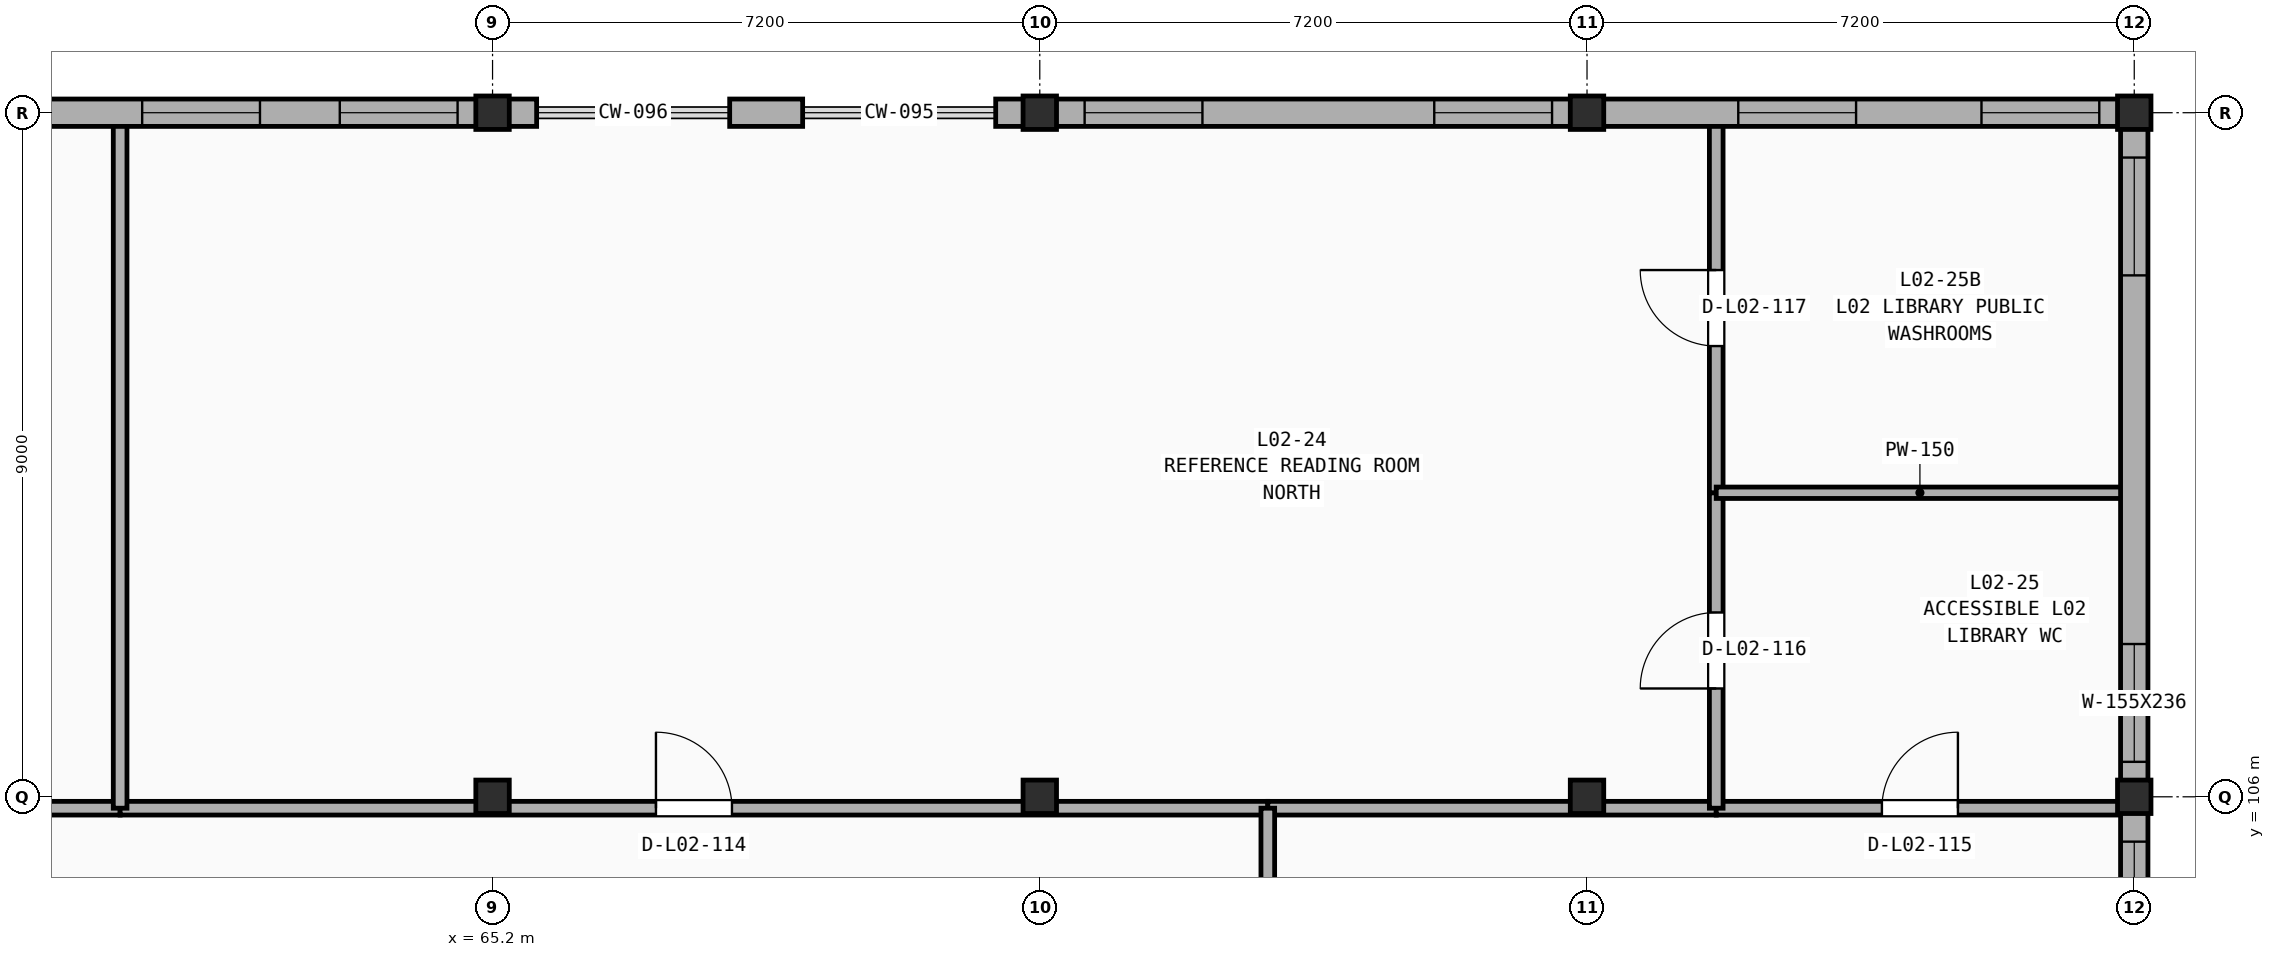
"""IFC4 building model, lengths in metres.
Left out: names, types, materials, properties, quantities, classifications, styles, units other than length and angle.
Written with IfcOpenShell. Run it as: python <this file> out.ifc"""

import sys

from ifc_helpers import new_model, si_unit, direction, frame, frame_2d, origin, origin_2d, place, context, subcontext, project, spatial, rectangle, extrude, element, fill, save


model = new_model("IFC4")
c1 = context("Model", 3, precision=1e-05, world=origin(), true_north=direction((0.0, 1.0)))
c2 = subcontext(c1, "Body", "Model", "MODEL_VIEW")
j1 = project(units=[si_unit("LENGTHUNIT", "METRE"), si_unit("PLANEANGLEUNIT", "RADIAN")], contexts=[c1])
p1 = place(None, origin())
s1 = spatial("IfcSite", under=j1, at=p1, CompositionType="ELEMENT")
p2 = place(p1, origin())
s2 = spatial("IfcBuilding", under=s1, at=p2, CompositionType="ELEMENT")
p3 = place(p2, frame((0.0, 0.0, 9.6)))
s3 = spatial("IfcBuildingStorey", under=s2, at=p3, CompositionType="ELEMENT", Elevation=9.6)
for number, where, z_axis, x_axis in (
    (1, (65.2, 106.0, 0.0), (0.0, 0.0, 1.0), (1.0, 0.0, 0.0)),
    (2, (65.2, 115.0, 0.0), (0.0, 0.0, 1.0), (1.0, 0.0, 0.0)),
    (3, (72.4, 106.0, 0.0), (0.0, 0.0, 1.0), (1.0, 0.0, 0.0)),
    (4, (72.4, 115.0, 0.0), (0.0, 0.0, 1.0), (1.0, 0.0, 0.0)),
    (5, (79.6, 106.0, 0.0), (0.0, 0.0, 1.0), (1.0, 0.0, 0.0)),
    (6, (79.6, 115.0, 0.0), (0.0, 0.0, 1.0), (1.0, 0.0, 0.0)),
    (7, (86.8, 106.0, 0.0), (0.0, 0.0, 1.0), (1.0, 0.0, 0.0)),
    (8, (86.8, 115.0, 0.0), (0.0, 0.0, 1.0), (1.0, 0.0, 0.0)),
):
    element("IfcColumn", number, at=place(p3, frame(where, z_axis=z_axis, x_axis=x_axis)), inside=s3, PredefinedType="COLUMN", context=c2, shape_type="SweptSolid", body=[
        extrude(rectangle(XDim=0.44, YDim=0.44, at=origin_2d()), origin(), (0.0, 0.0, 1.0), 4.2),
    ])
p4 = place(p3, frame((54.55, 105.85, 0.0), z_axis=(0.0, 0.0, 1.0), x_axis=(1.0, 0.0, 0.0)))
e9 = element("IfcWall", 9, at=p4, inside=s3, PredefinedType="PARTITIONING", context=c2, shape_type="SweptSolid", body=[
    extrude(rectangle(XDim=5.75, YDim=0.18, at=frame_2d((2.875, 0.0))), origin(), (0.0, 0.0, 1.0), 3.25),
])
p5 = place(p3, frame((60.3, 105.85, 0.0), z_axis=(0.0, 0.0, 1.0), x_axis=(1.0, 0.0, 0.0)))
e10 = element("IfcWall", 10, at=p5, inside=s3, PredefinedType="PARTITIONING", context=c2, shape_type="SweptSolid", body=[
    extrude(rectangle(XDim=15.1, YDim=0.18, at=frame_2d((7.55, 0.0))), origin(), (0.0, 0.0, 1.0), 3.25),
])
p6 = place(p5, frame((7.05, 0.0, -0.01)))
e11 = element("IfcOpeningElement", 11, at=p6, cuts=e10, PredefinedType="OPENING", context=c2, shape_type="SweptSolid", body=[
    extrude(rectangle(XDim=1.0, YDim=2.16, at=frame_2d((0.5, 1.08))), frame((0.0, 0.1, 0.0), z_axis=(0.0, -1.0, 0.0), x_axis=(1.0, 0.0, 0.0)), (0.0, 0.0, 1.0), 0.2),
])
p7 = place(p3, frame((75.4, 105.85, 0.0), z_axis=(0.0, 0.0, 1.0), x_axis=(1.0, 0.0, 0.0)))
e12 = element("IfcWall", 12, at=p7, inside=s3, PredefinedType="PARTITIONING", context=c2, shape_type="SweptSolid", body=[
    extrude(rectangle(XDim=5.9, YDim=0.18, at=frame_2d((2.95, 0.0))), origin(), (0.0, 0.0, 1.0), 3.25),
])
p8 = place(p3, frame((81.3, 105.85, 0.0), z_axis=(0.0, 0.0, 1.0), x_axis=(1.0, 0.0, 0.0)))
e13 = element("IfcWall", 13, at=p8, inside=s3, PredefinedType="PARTITIONING", context=c2, shape_type="SweptSolid", body=[
    extrude(rectangle(XDim=5.36, YDim=0.18, at=frame_2d((2.68, 0.0))), origin(), (0.0, 0.0, 1.0), 3.25),
])
p9 = place(p8, frame((2.18, 0.0, -0.01)))
e14 = element("IfcOpeningElement", 14, at=p9, cuts=e13, PredefinedType="OPENING", context=c2, shape_type="SweptSolid", body=[
    extrude(rectangle(XDim=1.0, YDim=2.16, at=frame_2d((0.5, 1.08))), frame((0.0, 0.1, 0.0), z_axis=(0.0, -1.0, 0.0), x_axis=(1.0, 0.0, 0.0)), (0.0, 0.0, 1.0), 0.2),
])
p10 = place(p3, frame((60.3, 105.85, 0.0), z_axis=(0.0, 0.0, 1.0), x_axis=(0.0, 1.0, 0.0)))
e15 = element("IfcWall", 15, at=p10, inside=s3, PredefinedType="PARTITIONING", context=c2, shape_type="SweptSolid", body=[
    extrude(rectangle(XDim=9.01, YDim=0.18, at=frame_2d((4.505, 0.0))), origin(), (0.0, 0.0, 1.0), 3.25),
])
p11 = place(p3, frame((81.3, 105.85, 0.0), z_axis=(0.0, 0.0, 1.0), x_axis=(0.0, 1.0, 0.0)))
e16 = element("IfcWall", 16, at=p11, inside=s3, PredefinedType="PARTITIONING", context=c2, shape_type="SweptSolid", body=[
    extrude(rectangle(XDim=4.15, YDim=0.18, at=frame_2d((2.075, 0.0))), origin(), (0.0, 0.0, 1.0), 3.25),
])
p12 = place(p11, frame((1.575, 0.0, -0.01)))
e17 = element("IfcOpeningElement", 17, at=p12, cuts=e16, PredefinedType="OPENING", context=c2, shape_type="SweptSolid", body=[
    extrude(rectangle(XDim=1.0, YDim=2.16, at=frame_2d((0.5, 1.08))), frame((0.0, 0.1, 0.0), z_axis=(0.0, -1.0, 0.0), x_axis=(1.0, 0.0, 0.0)), (0.0, 0.0, 1.0), 0.2),
])
p13 = place(p3, frame((81.3, 110.0, 0.0), z_axis=(0.0, 0.0, 1.0), x_axis=(0.0, 1.0, 0.0)))
e18 = element("IfcWall", 18, at=p13, inside=s3, PredefinedType="PARTITIONING", context=c2, shape_type="SweptSolid", body=[
    extrude(rectangle(XDim=4.86, YDim=0.18, at=frame_2d((2.43, 0.0))), origin(), (0.0, 0.0, 1.0), 3.61),
])
p14 = place(p13, frame((1.93, 0.0, -0.01)))
e19 = element("IfcOpeningElement", 19, at=p14, cuts=e18, PredefinedType="OPENING", context=c2, shape_type="SweptSolid", body=[
    extrude(rectangle(XDim=1.0, YDim=2.16, at=frame_2d((0.5, 1.08))), frame((0.0, 0.1, 0.0), z_axis=(0.0, -1.0, 0.0), x_axis=(1.0, 0.0, 0.0)), (0.0, 0.0, 1.0), 0.2),
])
p15 = place(p3, frame((81.3, 110.0, 0.0), z_axis=(0.0, 0.0, 1.0), x_axis=(1.0, 0.0, 0.0)))
e20 = element("IfcWall", 20, at=p15, inside=s3, PredefinedType="PARTITIONING", context=c2, shape_type="SweptSolid", body=[
    extrude(rectangle(XDim=5.36, YDim=0.15, at=frame_2d((2.68, 0.0))), origin(), (0.0, 0.0, 1.0), 3.57),
])
p16 = place(p3, frame((75.4, 97.5, 0.0), z_axis=(0.0, 0.0, 1.0), x_axis=(0.0, 1.0, 0.0)))
e21 = element("IfcWall", 21, at=p16, inside=s3, PredefinedType="PARTITIONING", context=c2, shape_type="SweptSolid", body=[
    extrude(rectangle(XDim=8.35, YDim=0.18, at=frame_2d((4.175, 0.0))), origin(), (0.0, 0.0, 1.0), 3.25),
])
p17 = place(p3, frame((65.2, 115.0, 0.0), z_axis=(0.0, 0.0, 1.0), x_axis=(-1.0, 0.0, 0.0)))
e22 = element("IfcWall", 22, at=p17, inside=s3, PredefinedType="SOLIDWALL", context=c2, shape_type="SweptSolid", body=[
    extrude(rectangle(XDim=7.2, YDim=0.36, at=frame_2d((3.6, 0.0))), origin(), (0.0, 0.0, 1.0), 3.45),
])
p18 = place(p17, frame((0.46, 0.0, 0.75)))
e23 = element("IfcOpeningElement", 23, at=p18, cuts=e22, PredefinedType="OPENING", context=c2, shape_type="SweptSolid", body=[
    extrude(rectangle(XDim=1.55, YDim=2.4, at=frame_2d((0.775, 1.2))), frame((0.0, 0.19, 0.0), z_axis=(0.0, -1.0, 0.0), x_axis=(1.0, 0.0, 0.0)), (0.0, 0.0, 1.0), 0.38),
])
p19 = place(p17, frame((3.06, 0.0, 0.75)))
e24 = element("IfcOpeningElement", 24, at=p19, cuts=e22, PredefinedType="OPENING", context=c2, shape_type="SweptSolid", body=[
    extrude(rectangle(XDim=1.55, YDim=2.4, at=frame_2d((0.775, 1.2))), frame((0.0, 0.19, 0.0), z_axis=(0.0, -1.0, 0.0), x_axis=(1.0, 0.0, 0.0)), (0.0, 0.0, 1.0), 0.38),
])
p20 = place(p3, frame((69.28, 115.0, 0.0), z_axis=(0.0, 0.0, 1.0), x_axis=(-1.0, 0.0, 0.0)))
e25 = element("IfcWall", 25, at=p20, inside=s3, PredefinedType="SOLIDWALL", context=c2, shape_type="SweptSolid", body=[
    extrude(rectangle(XDim=0.96, YDim=0.36, at=frame_2d((0.48, 0.0))), origin(), (0.0, 0.0, 1.0), 3.45),
])
for number, where, z_axis, x_axis in (
    (26, (72.27, 115.0, 0.0), (0.0, 0.0, 1.0), (-1.0, 0.0, 0.0)),
    (27, (65.78, 115.0, 0.0), (0.0, 0.0, 1.0), (-1.0, 0.0, 0.0)),
):
    element("IfcWall", number, at=place(p3, frame(where, z_axis=z_axis, x_axis=x_axis)), inside=s3, PredefinedType="SOLIDWALL", context=c2, shape_type="SweptSolid", body=[
        extrude(rectangle(XDim=0.45, YDim=0.36, at=frame_2d((0.225, 0.0))), origin(), (0.0, 0.0, 1.0), 3.45),
    ])
p21 = place(p3, frame((79.6, 115.0, 0.0), z_axis=(0.0, 0.0, 1.0), x_axis=(-1.0, 0.0, 0.0)))
e28 = element("IfcWall", 28, at=p21, inside=s3, PredefinedType="SOLIDWALL", context=c2, shape_type="SweptSolid", body=[
    extrude(rectangle(XDim=7.2, YDim=0.36, at=frame_2d((3.6, 0.0))), origin(), (0.0, 0.0, 1.0), 3.45),
])
p22 = place(p21, frame((0.46, 0.0, 0.75)))
e29 = element("IfcOpeningElement", 29, at=p22, cuts=e28, PredefinedType="OPENING", context=c2, shape_type="SweptSolid", body=[
    extrude(rectangle(XDim=1.55, YDim=2.4, at=frame_2d((0.775, 1.2))), frame((0.0, 0.19, 0.0), z_axis=(0.0, -1.0, 0.0), x_axis=(1.0, 0.0, 0.0)), (0.0, 0.0, 1.0), 0.38),
])
p23 = place(p21, frame((5.06, 0.0, 0.75)))
e30 = element("IfcOpeningElement", 30, at=p23, cuts=e28, PredefinedType="OPENING", context=c2, shape_type="SweptSolid", body=[
    extrude(rectangle(XDim=1.55, YDim=2.4, at=frame_2d((0.775, 1.2))), frame((0.0, 0.19, 0.0), z_axis=(0.0, -1.0, 0.0), x_axis=(1.0, 0.0, 0.0)), (0.0, 0.0, 1.0), 0.38),
])
p24 = place(p3, frame((86.8, 115.0, 0.0), z_axis=(0.0, 0.0, 1.0), x_axis=(-1.0, 0.0, 0.0)))
e31 = element("IfcWall", 31, at=p24, inside=s3, PredefinedType="SOLIDWALL", context=c2, shape_type="SweptSolid", body=[
    extrude(rectangle(XDim=7.2, YDim=0.36, at=frame_2d((3.6, 0.0))), origin(), (0.0, 0.0, 1.0), 3.45),
])
p25 = place(p24, frame((0.46, 0.0, 0.75)))
e32 = element("IfcOpeningElement", 32, at=p25, cuts=e31, PredefinedType="OPENING", context=c2, shape_type="SweptSolid", body=[
    extrude(rectangle(XDim=1.55, YDim=2.4, at=frame_2d((0.775, 1.2))), frame((0.0, 0.19, 0.0), z_axis=(0.0, -1.0, 0.0), x_axis=(1.0, 0.0, 0.0)), (0.0, 0.0, 1.0), 0.38),
])
p26 = place(p24, frame((3.66, 0.0, 0.75)))
e33 = element("IfcOpeningElement", 33, at=p26, cuts=e31, PredefinedType="OPENING", context=c2, shape_type="SweptSolid", body=[
    extrude(rectangle(XDim=1.55, YDim=2.4, at=frame_2d((0.775, 1.2))), frame((0.0, 0.19, 0.0), z_axis=(0.0, -1.0, 0.0), x_axis=(1.0, 0.0, 0.0)), (0.0, 0.0, 1.0), 0.38),
])
p27 = place(p3, frame((86.8, 97.6, 0.0), z_axis=(0.0, 0.0, 1.0), x_axis=(0.0, 1.0, 0.0)))
e34 = element("IfcWall", 34, at=p27, inside=s3, PredefinedType="SOLIDWALL", context=c2, shape_type="SweptSolid", body=[
    extrude(rectangle(XDim=8.4, YDim=0.36, at=frame_2d((4.2, 0.0))), origin(), (0.0, 0.0, 1.0), 3.25),
])
p28 = place(p27, frame((0.46, 0.0, 0.75)))
e35 = element("IfcOpeningElement", 35, at=p28, cuts=e34, PredefinedType="OPENING", context=c2, shape_type="SweptSolid", body=[
    extrude(rectangle(XDim=1.55, YDim=2.36, at=frame_2d((0.775, 1.18))), frame((0.0, 0.19, 0.0), z_axis=(0.0, -1.0, 0.0), x_axis=(1.0, 0.0, 0.0)), (0.0, 0.0, 1.0), 0.38),
])
p29 = place(p27, frame((6.26, 0.0, 0.75)))
e36 = element("IfcOpeningElement", 36, at=p29, cuts=e34, PredefinedType="OPENING", context=c2, shape_type="SweptSolid", body=[
    extrude(rectangle(XDim=1.55, YDim=2.36, at=frame_2d((0.775, 1.18))), frame((0.0, 0.19, 0.0), z_axis=(0.0, -1.0, 0.0), x_axis=(1.0, 0.0, 0.0)), (0.0, 0.0, 1.0), 0.38),
])
p30 = place(p3, frame((86.8, 106.0, 0.0), z_axis=(0.0, 0.0, 1.0), x_axis=(0.0, 1.0, 0.0)))
e37 = element("IfcWall", 37, at=p30, inside=s3, PredefinedType="SOLIDWALL", context=c2, shape_type="SweptSolid", body=[
    extrude(rectangle(XDim=9.0, YDim=0.36, at=frame_2d((4.5, 0.0))), origin(), (0.0, 0.0, 1.0), 3.25),
])
p31 = place(p30, frame((0.46, 0.0, 0.75)))
e38 = element("IfcOpeningElement", 38, at=p31, cuts=e37, PredefinedType="OPENING", context=c2, shape_type="SweptSolid", body=[
    extrude(rectangle(XDim=1.55, YDim=2.36, at=frame_2d((0.775, 1.18))), frame((0.0, 0.19, 0.0), z_axis=(0.0, -1.0, 0.0), x_axis=(1.0, 0.0, 0.0)), (0.0, 0.0, 1.0), 0.38),
])
p32 = place(p30, frame((6.86, 0.0, 0.75)))
e39 = element("IfcOpeningElement", 39, at=p32, cuts=e37, PredefinedType="OPENING", context=c2, shape_type="SweptSolid", body=[
    extrude(rectangle(XDim=1.55, YDim=2.36, at=frame_2d((0.775, 1.18))), frame((0.0, 0.19, 0.0), z_axis=(0.0, -1.0, 0.0), x_axis=(1.0, 0.0, 0.0)), (0.0, 0.0, 1.0), 0.38),
])
p33 = place(p6, frame((1.0, 0.0, 0.01), z_axis=(0.0, 0.0, 1.0), x_axis=(-1.0, 0.0, 0.0)))
e40 = element("IfcDoor", 40, at=p33, inside=s3, OperationType="SINGLE_SWING_LEFT", PredefinedType="DOOR", context=c2, shape_type="SweptSolid", body=[
    extrude(rectangle(XDim=1.0, YDim=2.15, at=frame_2d((0.5, 1.075))), frame((0.0, 0.025, 0.0), z_axis=(0.0, -1.0, 0.0), x_axis=(1.0, 0.0, 0.0)), (0.0, 0.0, 1.0), 0.05),
])
fill(e11, e40)
p34 = place(p9, frame((0.0, 0.0, 0.01)))
e41 = element("IfcDoor", 41, at=p34, inside=s3, OperationType="SINGLE_SWING_RIGHT", PredefinedType="DOOR", context=c2, shape_type="SweptSolid", body=[
    extrude(rectangle(XDim=1.0, YDim=2.15, at=frame_2d((0.5, 1.075))), frame((0.0, 0.025, 0.0), z_axis=(0.0, -1.0, 0.0), x_axis=(1.0, 0.0, 0.0)), (0.0, 0.0, 1.0), 0.05),
])
fill(e14, e41)
p35 = place(p12, frame((0.0, 0.0, 0.01)))
e42 = element("IfcDoor", 42, at=p35, inside=s3, OperationType="SINGLE_SWING_LEFT", PredefinedType="DOOR", context=c2, shape_type="SweptSolid", body=[
    extrude(rectangle(XDim=1.0, YDim=2.15, at=frame_2d((0.5, 1.075))), frame((0.0, 0.025, 0.0), z_axis=(0.0, -1.0, 0.0), x_axis=(1.0, 0.0, 0.0)), (0.0, 0.0, 1.0), 0.05),
])
fill(e17, e42)
p36 = place(p14, frame((1.0, 0.0, 0.01), z_axis=(0.0, 0.0, 1.0), x_axis=(-1.0, 0.0, 0.0)))
e43 = element("IfcDoor", 43, at=p36, inside=s3, OperationType="SINGLE_SWING_RIGHT", PredefinedType="DOOR", context=c2, shape_type="SweptSolid", body=[
    extrude(rectangle(XDim=1.0, YDim=2.15, at=frame_2d((0.5, 1.075))), frame((0.0, 0.025, 0.0), z_axis=(0.0, -1.0, 0.0), x_axis=(1.0, 0.0, 0.0)), (0.0, 0.0, 1.0), 0.05),
])
fill(e19, e43)
p37 = place(p18, origin())
e44 = element("IfcWindow", 44, at=p37, inside=s3, PartitioningType="DOUBLE_PANEL_HORIZONTAL", PredefinedType="WINDOW", context=c2, shape_type="SweptSolid", body=[
    extrude(rectangle(XDim=1.55, YDim=2.4, at=frame_2d((0.775, 1.2))), frame((0.0, 0.03, 0.0), z_axis=(0.0, -1.0, 0.0), x_axis=(1.0, 0.0, 0.0)), (0.0, 0.0, 1.0), 0.06),
])
fill(e23, e44)
p38 = place(p19, origin())
e45 = element("IfcWindow", 45, at=p38, inside=s3, PartitioningType="DOUBLE_PANEL_HORIZONTAL", PredefinedType="WINDOW", context=c2, shape_type="SweptSolid", body=[
    extrude(rectangle(XDim=1.55, YDim=2.4, at=frame_2d((0.775, 1.2))), frame((0.0, 0.03, 0.0), z_axis=(0.0, -1.0, 0.0), x_axis=(1.0, 0.0, 0.0)), (0.0, 0.0, 1.0), 0.06),
])
fill(e24, e45)
p39 = place(p22, origin())
e46 = element("IfcWindow", 46, at=p39, inside=s3, PartitioningType="DOUBLE_PANEL_HORIZONTAL", PredefinedType="WINDOW", context=c2, shape_type="SweptSolid", body=[
    extrude(rectangle(XDim=1.55, YDim=2.4, at=frame_2d((0.775, 1.2))), frame((0.0, 0.03, 0.0), z_axis=(0.0, -1.0, 0.0), x_axis=(1.0, 0.0, 0.0)), (0.0, 0.0, 1.0), 0.06),
])
fill(e29, e46)
p40 = place(p23, origin())
e47 = element("IfcWindow", 47, at=p40, inside=s3, PartitioningType="DOUBLE_PANEL_HORIZONTAL", PredefinedType="WINDOW", context=c2, shape_type="SweptSolid", body=[
    extrude(rectangle(XDim=1.55, YDim=2.4, at=frame_2d((0.775, 1.2))), frame((0.0, 0.03, 0.0), z_axis=(0.0, -1.0, 0.0), x_axis=(1.0, 0.0, 0.0)), (0.0, 0.0, 1.0), 0.06),
])
fill(e30, e47)
p41 = place(p25, origin())
e48 = element("IfcWindow", 48, at=p41, inside=s3, PartitioningType="DOUBLE_PANEL_HORIZONTAL", PredefinedType="WINDOW", context=c2, shape_type="SweptSolid", body=[
    extrude(rectangle(XDim=1.55, YDim=2.4, at=frame_2d((0.775, 1.2))), frame((0.0, 0.03, 0.0), z_axis=(0.0, -1.0, 0.0), x_axis=(1.0, 0.0, 0.0)), (0.0, 0.0, 1.0), 0.06),
])
fill(e32, e48)
p42 = place(p26, origin())
e49 = element("IfcWindow", 49, at=p42, inside=s3, PartitioningType="DOUBLE_PANEL_HORIZONTAL", PredefinedType="WINDOW", context=c2, shape_type="SweptSolid", body=[
    extrude(rectangle(XDim=1.55, YDim=2.4, at=frame_2d((0.775, 1.2))), frame((0.0, 0.03, 0.0), z_axis=(0.0, -1.0, 0.0), x_axis=(1.0, 0.0, 0.0)), (0.0, 0.0, 1.0), 0.06),
])
fill(e33, e49)
p43 = place(p29, origin())
e50 = element("IfcWindow", 50, at=p43, inside=s3, PartitioningType="DOUBLE_PANEL_HORIZONTAL", PredefinedType="WINDOW", context=c2, shape_type="SweptSolid", body=[
    extrude(rectangle(XDim=1.55, YDim=2.36, at=frame_2d((0.775, 1.18))), frame((0.0, 0.03, 0.0), z_axis=(0.0, -1.0, 0.0), x_axis=(1.0, 0.0, 0.0)), (0.0, 0.0, 1.0), 0.06),
])
fill(e36, e50)
p44 = place(p31, origin())
e51 = element("IfcWindow", 51, at=p44, inside=s3, PartitioningType="DOUBLE_PANEL_HORIZONTAL", PredefinedType="WINDOW", context=c2, shape_type="SweptSolid", body=[
    extrude(rectangle(XDim=1.55, YDim=2.36, at=frame_2d((0.775, 1.18))), frame((0.0, 0.03, 0.0), z_axis=(0.0, -1.0, 0.0), x_axis=(1.0, 0.0, 0.0)), (0.0, 0.0, 1.0), 0.06),
])
fill(e38, e51)
p45 = place(p32, origin())
e52 = element("IfcWindow", 52, at=p45, inside=s3, PartitioningType="DOUBLE_PANEL_HORIZONTAL", PredefinedType="WINDOW", context=c2, shape_type="SweptSolid", body=[
    extrude(rectangle(XDim=1.55, YDim=2.36, at=frame_2d((0.775, 1.18))), frame((0.0, 0.03, 0.0), z_axis=(0.0, -1.0, 0.0), x_axis=(1.0, 0.0, 0.0)), (0.0, 0.0, 1.0), 0.06),
])
fill(e39, e52)
save(model, sys.argv[1])
